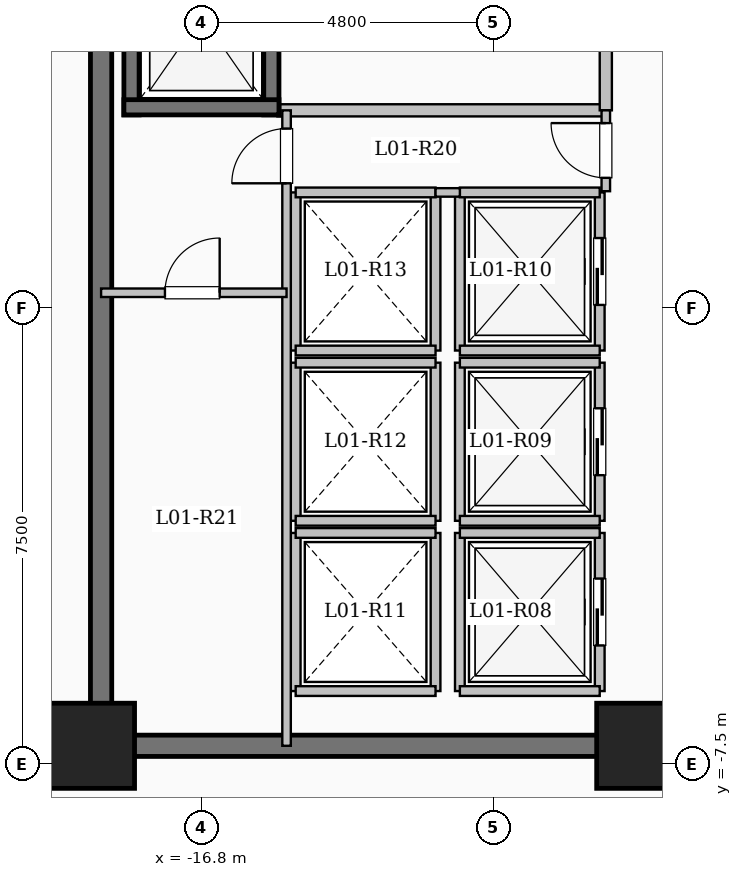
"""IFC4 building model, lengths in metres.
Left out: names, types, materials, properties, quantities, classifications, styles, units other than length and angle.
Written with IfcOpenShell. Run it as: python <this file> out.ifc"""

import sys

from ifc_helpers import new_model, si_unit, direction, frame, frame_2d, origin, origin_2d, place, context, subcontext, project, spatial, rectangle, extrude, element, fill, save


model = new_model("IFC4")
c1 = context("Model", 3, precision=1e-05, world=origin(), true_north=direction((0.0, 1.0)))
c2 = subcontext(c1, "Body", "Model", "MODEL_VIEW")
j1 = project(units=[si_unit("LENGTHUNIT", "METRE"), si_unit("PLANEANGLEUNIT", "RADIAN")], contexts=[c1])
p1 = place(None, origin())
s1 = spatial("IfcSite", under=j1, at=p1, CompositionType="ELEMENT")
p2 = place(p1, origin())
s2 = spatial("IfcBuilding", under=s1, at=p2, CompositionType="ELEMENT")
p3 = place(p2, frame((0.0, 0.0, 5.4)))
s3 = spatial("IfcBuildingStorey", under=s2, at=p3, CompositionType="ELEMENT", Elevation=5.4)
for number, where, z_axis, x_axis in (
    (1, (-9.6, -7.2, 0.0), (0.0, 0.0, 1.0), (1.0, 0.0, 0.0)),
    (2, (-18.6, -7.2, 0.0), (0.0, 0.0, 1.0), (1.0, 0.0, 0.0)),
):
    element("IfcColumn", number, at=place(p3, frame(where, z_axis=z_axis, x_axis=x_axis)), inside=s3, PredefinedType="COLUMN", context=c2, shape_type="SweptSolid", body=[
        extrude(rectangle(XDim=1.4, YDim=1.4, at=origin_2d()), origin(), (0.0, 0.0, 1.0), 4.5),
    ])
p4 = place(p3, frame((-15.55, 3.25, 0.0), z_axis=(0.0, 0.0, 1.0), x_axis=(1.0, 0.0, 0.0)))
e3 = element("IfcWall", 3, at=p4, inside=s3, PredefinedType="SOLIDWALL", context=c2, shape_type="SweptSolid", body=[
    extrude(rectangle(XDim=5.4, YDim=0.2, at=frame_2d((2.7, 0.0))), origin(), (0.0, 0.0, 1.0), 4.2),
])
p5 = place(p3, frame((-10.15, 3.25, 0.0), z_axis=(0.0, 0.0, 1.0), x_axis=(0.0, 1.0, 0.0)))
e4 = element("IfcWall", 4, at=p5, inside=s3, PredefinedType="SOLIDWALL", context=c2, shape_type="SweptSolid", body=[
    extrude(rectangle(XDim=3.25, YDim=0.2, at=frame_2d((1.625, 0.0))), origin(), (0.0, 0.0, 1.0), 4.2),
])
p6 = place(p5, frame((1.1, 0.0, 0.0)))
e5 = element("IfcOpeningElement", 5, at=p6, cuts=e4, PredefinedType="OPENING", context=c2, shape_type="SweptSolid", body=[
    extrude(rectangle(XDim=1.02, YDim=2.15, at=frame_2d((0.51, 1.075))), frame((0.0, 0.11, 0.0), z_axis=(0.0, -1.0, 0.0), x_axis=(1.0, 0.0, 0.0)), (0.0, 0.0, 1.0), 0.22),
])
p7 = place(p3, frame((-17.95, 3.175, 0.0), z_axis=(0.0, 0.0, 1.0), x_axis=(0.0, 1.0, 0.0)))
e6 = element("IfcWall", 6, at=p7, inside=s3, PredefinedType="SHEAR", context=c2, shape_type="SweptSolid", body=[
    extrude(rectangle(XDim=3.25, YDim=0.25, at=frame_2d((1.625, 0.0))), origin(), (0.0, 0.0, 1.0), 4.5),
])
p8 = place(p3, frame((-15.65, 3.175, 0.0), z_axis=(0.0, 0.0, 1.0), x_axis=(0.0, 1.0, 0.0)))
e7 = element("IfcWall", 7, at=p8, inside=s3, PredefinedType="SHEAR", context=c2, shape_type="SweptSolid", body=[
    extrude(rectangle(XDim=3.25, YDim=0.25, at=frame_2d((1.625, 0.0))), origin(), (0.0, 0.0, 1.0), 4.5),
])
p9 = place(p8, frame((1.075, 0.0, 0.0)))
e8 = element("IfcOpeningElement", 8, at=p9, cuts=e7, PredefinedType="OPENING", context=c2, shape_type="SweptSolid", body=[
    extrude(rectangle(XDim=1.1, YDim=2.15, at=frame_2d((0.55, 1.075))), frame((0.0, 0.135, 0.0), z_axis=(0.0, -1.0, 0.0), x_axis=(1.0, 0.0, 0.0)), (0.0, 0.0, 1.0), 0.27),
])
p10 = place(p3, frame((-18.075, 3.3, 0.0), z_axis=(0.0, 0.0, 1.0), x_axis=(1.0, 0.0, 0.0)))
e9 = element("IfcWall", 9, at=p10, inside=s3, PredefinedType="SHEAR", context=c2, shape_type="SweptSolid", body=[
    extrude(rectangle(XDim=2.55, YDim=0.25, at=frame_2d((1.275, 0.0))), origin(), (0.0, 0.0, 1.0), 4.5),
])
p11 = place(p3, frame((-12.55, -6.3, 0.0), z_axis=(0.0, 0.0, 1.0), x_axis=(0.0, 1.0, 0.0)))
e10 = element("IfcWall", 10, at=p11, inside=s3, PredefinedType="SOLIDWALL", context=c2, shape_type="SweptSolid", body=[
    extrude(rectangle(XDim=2.6, YDim=0.16, at=frame_2d((1.3, 0.0))), origin(), (0.0, 0.0, 1.0), 4.2),
])
p12 = place(p3, frame((-10.25, -6.3, 0.0), z_axis=(0.0, 0.0, 1.0), x_axis=(0.0, 1.0, 0.0)))
e11 = element("IfcWall", 11, at=p12, inside=s3, PredefinedType="SOLIDWALL", context=c2, shape_type="SweptSolid", body=[
    extrude(rectangle(XDim=2.6, YDim=0.16, at=frame_2d((1.3, 0.0))), origin(), (0.0, 0.0, 1.0), 4.2),
])
p13 = place(p12, frame((0.75, 0.0, 0.0)))
e12 = element("IfcOpeningElement", 12, at=p13, cuts=e11, PredefinedType="OPENING", context=c2, shape_type="SweptSolid", body=[
    extrude(rectangle(XDim=1.1, YDim=2.15, at=frame_2d((0.55, 1.075))), frame((0.0, 0.09, 0.0), z_axis=(0.0, -1.0, 0.0), x_axis=(1.0, 0.0, 0.0)), (0.0, 0.0, 1.0), 0.18),
])
for number, where, z_axis, x_axis in (
    (13, (-12.55, -6.3, 0.0), (0.0, 0.0, 1.0), (1.0, 0.0, 0.0)),
    (14, (-12.55, -3.7, 0.0), (0.0, 0.0, 1.0), (1.0, 0.0, 0.0)),
):
    element("IfcWall", number, at=place(p3, frame(where, z_axis=z_axis, x_axis=x_axis)), inside=s3, PredefinedType="SOLIDWALL", context=c2, shape_type="SweptSolid", body=[
        extrude(rectangle(XDim=2.3, YDim=0.16, at=frame_2d((1.15, 0.0))), origin(), (0.0, 0.0, 1.0), 4.2),
    ])
p14 = place(p3, frame((-12.55, -3.5, 0.0), z_axis=(0.0, 0.0, 1.0), x_axis=(0.0, 1.0, 0.0)))
e15 = element("IfcWall", 15, at=p14, inside=s3, PredefinedType="SOLIDWALL", context=c2, shape_type="SweptSolid", body=[
    extrude(rectangle(XDim=2.6, YDim=0.16, at=frame_2d((1.3, 0.0))), origin(), (0.0, 0.0, 1.0), 4.2),
])
p15 = place(p3, frame((-10.25, -3.5, 0.0), z_axis=(0.0, 0.0, 1.0), x_axis=(0.0, 1.0, 0.0)))
e16 = element("IfcWall", 16, at=p15, inside=s3, PredefinedType="SOLIDWALL", context=c2, shape_type="SweptSolid", body=[
    extrude(rectangle(XDim=2.6, YDim=0.16, at=frame_2d((1.3, 0.0))), origin(), (0.0, 0.0, 1.0), 4.2),
])
p16 = place(p15, frame((0.75, 0.0, 0.0)))
e17 = element("IfcOpeningElement", 17, at=p16, cuts=e16, PredefinedType="OPENING", context=c2, shape_type="SweptSolid", body=[
    extrude(rectangle(XDim=1.1, YDim=2.15, at=frame_2d((0.55, 1.075))), frame((0.0, 0.09, 0.0), z_axis=(0.0, -1.0, 0.0), x_axis=(1.0, 0.0, 0.0)), (0.0, 0.0, 1.0), 0.18),
])
for number, where, z_axis, x_axis in (
    (18, (-12.55, -3.5, 0.0), (0.0, 0.0, 1.0), (1.0, 0.0, 0.0)),
    (19, (-12.55, -0.9, 0.0), (0.0, 0.0, 1.0), (1.0, 0.0, 0.0)),
):
    element("IfcWall", number, at=place(p3, frame(where, z_axis=z_axis, x_axis=x_axis)), inside=s3, PredefinedType="SOLIDWALL", context=c2, shape_type="SweptSolid", body=[
        extrude(rectangle(XDim=2.3, YDim=0.16, at=frame_2d((1.15, 0.0))), origin(), (0.0, 0.0, 1.0), 4.2),
    ])
p17 = place(p3, frame((-12.55, -0.7, 0.0), z_axis=(0.0, 0.0, 1.0), x_axis=(0.0, 1.0, 0.0)))
e20 = element("IfcWall", 20, at=p17, inside=s3, PredefinedType="SOLIDWALL", context=c2, shape_type="SweptSolid", body=[
    extrude(rectangle(XDim=2.6, YDim=0.16, at=frame_2d((1.3, 0.0))), origin(), (0.0, 0.0, 1.0), 4.2),
])
p18 = place(p3, frame((-10.25, -0.7, 0.0), z_axis=(0.0, 0.0, 1.0), x_axis=(0.0, 1.0, 0.0)))
e21 = element("IfcWall", 21, at=p18, inside=s3, PredefinedType="SOLIDWALL", context=c2, shape_type="SweptSolid", body=[
    extrude(rectangle(XDim=2.6, YDim=0.16, at=frame_2d((1.3, 0.0))), origin(), (0.0, 0.0, 1.0), 4.2),
])
p19 = place(p18, frame((0.75, 0.0, 0.0)))
e22 = element("IfcOpeningElement", 22, at=p19, cuts=e21, PredefinedType="OPENING", context=c2, shape_type="SweptSolid", body=[
    extrude(rectangle(XDim=1.1, YDim=2.15, at=frame_2d((0.55, 1.075))), frame((0.0, 0.09, 0.0), z_axis=(0.0, -1.0, 0.0), x_axis=(1.0, 0.0, 0.0)), (0.0, 0.0, 1.0), 0.18),
])
for number, where, z_axis, x_axis in (
    (23, (-12.55, -0.7, 0.0), (0.0, 0.0, 1.0), (1.0, 0.0, 0.0)),
    (24, (-12.55, 1.9, 0.0), (0.0, 0.0, 1.0), (1.0, 0.0, 0.0)),
):
    element("IfcWall", number, at=place(p3, frame(where, z_axis=z_axis, x_axis=x_axis)), inside=s3, PredefinedType="SOLIDWALL", context=c2, shape_type="SweptSolid", body=[
        extrude(rectangle(XDim=2.3, YDim=0.16, at=frame_2d((1.15, 0.0))), origin(), (0.0, 0.0, 1.0), 4.2),
    ])
for number, where, z_axis, x_axis in (
    (25, (-15.25, -6.3, 0.0), (0.0, 0.0, 1.0), (0.0, 1.0, 0.0)),
    (26, (-12.95, -6.3, 0.0), (0.0, 0.0, 1.0), (0.0, 1.0, 0.0)),
):
    element("IfcWall", number, at=place(p3, frame(where, z_axis=z_axis, x_axis=x_axis)), inside=s3, PredefinedType="SOLIDWALL", context=c2, shape_type="SweptSolid", body=[
        extrude(rectangle(XDim=2.6, YDim=0.16, at=frame_2d((1.3, 0.0))), origin(), (0.0, 0.0, 1.0), 4.2),
    ])
for number, where, z_axis, x_axis in (
    (27, (-15.25, -6.3, 0.0), (0.0, 0.0, 1.0), (1.0, 0.0, 0.0)),
    (28, (-15.25, -3.7, 0.0), (0.0, 0.0, 1.0), (1.0, 0.0, 0.0)),
):
    element("IfcWall", number, at=place(p3, frame(where, z_axis=z_axis, x_axis=x_axis)), inside=s3, PredefinedType="SOLIDWALL", context=c2, shape_type="SweptSolid", body=[
        extrude(rectangle(XDim=2.3, YDim=0.16, at=frame_2d((1.15, 0.0))), origin(), (0.0, 0.0, 1.0), 4.2),
    ])
for number, where, z_axis, x_axis in (
    (29, (-15.25, -3.5, 0.0), (0.0, 0.0, 1.0), (0.0, 1.0, 0.0)),
    (30, (-12.95, -3.5, 0.0), (0.0, 0.0, 1.0), (0.0, 1.0, 0.0)),
):
    element("IfcWall", number, at=place(p3, frame(where, z_axis=z_axis, x_axis=x_axis)), inside=s3, PredefinedType="SOLIDWALL", context=c2, shape_type="SweptSolid", body=[
        extrude(rectangle(XDim=2.6, YDim=0.16, at=frame_2d((1.3, 0.0))), origin(), (0.0, 0.0, 1.0), 4.2),
    ])
for number, where, z_axis, x_axis in (
    (31, (-15.25, -3.5, 0.0), (0.0, 0.0, 1.0), (1.0, 0.0, 0.0)),
    (32, (-15.25, -0.9, 0.0), (0.0, 0.0, 1.0), (1.0, 0.0, 0.0)),
):
    element("IfcWall", number, at=place(p3, frame(where, z_axis=z_axis, x_axis=x_axis)), inside=s3, PredefinedType="SOLIDWALL", context=c2, shape_type="SweptSolid", body=[
        extrude(rectangle(XDim=2.3, YDim=0.16, at=frame_2d((1.15, 0.0))), origin(), (0.0, 0.0, 1.0), 4.2),
    ])
for number, where, z_axis, x_axis in (
    (33, (-15.25, -0.7, 0.0), (0.0, 0.0, 1.0), (0.0, 1.0, 0.0)),
    (34, (-12.95, -0.7, 0.0), (0.0, 0.0, 1.0), (0.0, 1.0, 0.0)),
):
    element("IfcWall", number, at=place(p3, frame(where, z_axis=z_axis, x_axis=x_axis)), inside=s3, PredefinedType="SOLIDWALL", context=c2, shape_type="SweptSolid", body=[
        extrude(rectangle(XDim=2.6, YDim=0.16, at=frame_2d((1.3, 0.0))), origin(), (0.0, 0.0, 1.0), 4.2),
    ])
for number, where, z_axis, x_axis in (
    (35, (-15.25, -0.7, 0.0), (0.0, 0.0, 1.0), (1.0, 0.0, 0.0)),
    (36, (-15.25, 1.9, 0.0), (0.0, 0.0, 1.0), (1.0, 0.0, 0.0)),
):
    element("IfcWall", number, at=place(p3, frame(where, z_axis=z_axis, x_axis=x_axis)), inside=s3, PredefinedType="SOLIDWALL", context=c2, shape_type="SweptSolid", body=[
        extrude(rectangle(XDim=2.3, YDim=0.16, at=frame_2d((1.15, 0.0))), origin(), (0.0, 0.0, 1.0), 4.2),
    ])
p20 = place(p3, frame((-18.45, -7.375, 0.0), z_axis=(0.0, 0.0, 1.0), x_axis=(0.0, 1.0, 0.0)))
e37 = element("IfcWall", 37, at=p20, inside=s3, PredefinedType="SHEAR", context=c2, shape_type="SweptSolid", body=[
    extrude(rectangle(XDim=14.05, YDim=0.35, at=frame_2d((7.025, 0.0))), origin(), (0.0, 0.0, 1.0), 4.5),
])
p21 = place(p3, frame((-18.625, -7.2, 0.0), z_axis=(0.0, 0.0, 1.0), x_axis=(1.0, 0.0, 0.0)))
e38 = element("IfcWall", 38, at=p21, inside=s3, PredefinedType="SHEAR", context=c2, shape_type="SweptSolid", body=[
    extrude(rectangle(XDim=8.55, YDim=0.35, at=frame_2d((4.275, 0.0))), origin(), (0.0, 0.0, 1.0), 4.5),
])
p22 = place(p3, frame((-12.95, 1.9, 0.0), z_axis=(0.0, 0.0, 1.0), x_axis=(1.0, 0.0, 0.0)))
e39 = element("IfcWall", 39, at=p22, inside=s3, PredefinedType="PARTITIONING", context=c2, shape_type="SweptSolid", body=[
    extrude(rectangle(XDim=0.4, YDim=0.14, at=frame_2d((0.2, 0.0))), origin(), (0.0, 0.0, 1.0), 4.2),
])
p23 = place(p3, frame((-10.15, 1.92, 0.0), z_axis=(0.0, 0.0, 1.0), x_axis=(0.0, 1.0, 0.0)))
e40 = element("IfcWall", 40, at=p23, inside=s3, PredefinedType="PARTITIONING", context=c2, shape_type="SweptSolid", body=[
    extrude(rectangle(XDim=1.33, YDim=0.14, at=frame_2d((0.665, 0.0))), origin(), (0.0, 0.0, 1.0), 4.2),
])
p24 = place(p23, frame((0.22, 0.0, 0.0)))
e41 = element("IfcOpeningElement", 41, at=p24, cuts=e40, PredefinedType="OPENING", context=c2, shape_type="SweptSolid", body=[
    extrude(rectangle(XDim=0.9, YDim=2.08, at=frame_2d((0.45, 1.04))), frame((0.0, 0.08, 0.0), z_axis=(0.0, -1.0, 0.0), x_axis=(1.0, 0.0, 0.0)), (0.0, 0.0, 1.0), 0.16),
])
p25 = place(p3, frame((-15.4, -7.2, 0.0), z_axis=(0.0, 0.0, 1.0), x_axis=(0.0, 1.0, 0.0)))
e42 = element("IfcWall", 42, at=p25, inside=s3, PredefinedType="PARTITIONING", context=c2, shape_type="SweptSolid", body=[
    extrude(rectangle(XDim=10.45, YDim=0.14, at=frame_2d((5.225, 0.0))), origin(), (0.0, 0.0, 1.0), 4.2),
])
p26 = place(p25, frame((9.25, 0.0, 0.0)))
e43 = element("IfcOpeningElement", 43, at=p26, cuts=e42, PredefinedType="OPENING", context=c2, shape_type="SweptSolid", body=[
    extrude(rectangle(XDim=0.9, YDim=2.08, at=frame_2d((0.45, 1.04))), frame((0.0, 0.08, 0.0), z_axis=(0.0, -1.0, 0.0), x_axis=(1.0, 0.0, 0.0)), (0.0, 0.0, 1.0), 0.16),
])
p27 = place(p3, frame((-18.45, 0.25, 0.0), z_axis=(0.0, 0.0, 1.0), x_axis=(1.0, 0.0, 0.0)))
e44 = element("IfcWall", 44, at=p27, inside=s3, PredefinedType="PARTITIONING", context=c2, shape_type="SweptSolid", body=[
    extrude(rectangle(XDim=3.05, YDim=0.14, at=frame_2d((1.525, 0.0))), origin(), (0.0, 0.0, 1.0), 4.2),
])
p28 = place(p27, frame((1.05, 0.0, 0.0)))
e45 = element("IfcOpeningElement", 45, at=p28, cuts=e44, PredefinedType="OPENING", context=c2, shape_type="SweptSolid", body=[
    extrude(rectangle(XDim=0.9, YDim=2.08, at=frame_2d((0.45, 1.04))), frame((0.0, 0.08, 0.0), z_axis=(0.0, -1.0, 0.0), x_axis=(1.0, 0.0, 0.0)), (0.0, 0.0, 1.0), 0.16),
])
p29 = place(p3, frame((-28.88, -7.25, 0.0), z_axis=(0.0, 0.0, 1.0), x_axis=(1.0, 0.0, 0.0)))
e46 = element("IfcWall", 46, at=p29, inside=s3, PredefinedType="PARTITIONING", context=c2, shape_type="SweptSolid", body=[
    extrude(rectangle(XDim=10.43, YDim=0.15, at=frame_2d((5.215, 0.0))), origin(), (0.0, 0.0, 1.0), 4.2),
])
p30 = place(p29, frame((2.5, 0.0, 0.0)))
e47 = element("IfcOpeningElement", 47, at=p30, cuts=e46, PredefinedType="OPENING", context=c2, shape_type="SweptSolid", body=[
    extrude(rectangle(XDim=1.08, YDim=2.15, at=frame_2d((0.54, 1.075))), frame((0.0, 0.085, 0.0), z_axis=(0.0, -1.0, 0.0), x_axis=(1.0, 0.0, 0.0)), (0.0, 0.0, 1.0), 0.17),
])
p31 = place(p13, origin())
e48 = element("IfcDoor", 48, at=p31, inside=s3, OperationType="SLIDING_TO_LEFT", PredefinedType="DOOR", context=c2, shape_type="SweptSolid", body=[
    extrude(rectangle(XDim=1.1, YDim=2.15, at=frame_2d((0.55, 1.075))), frame((0.0, 0.025, 0.0), z_axis=(0.0, -1.0, 0.0), x_axis=(1.0, 0.0, 0.0)), (0.0, 0.0, 1.0), 0.05),
])
fill(e12, e48)
p32 = place(p16, origin())
e49 = element("IfcDoor", 49, at=p32, inside=s3, OperationType="SLIDING_TO_LEFT", PredefinedType="DOOR", context=c2, shape_type="SweptSolid", body=[
    extrude(rectangle(XDim=1.1, YDim=2.15, at=frame_2d((0.55, 1.075))), frame((0.0, 0.025, 0.0), z_axis=(0.0, -1.0, 0.0), x_axis=(1.0, 0.0, 0.0)), (0.0, 0.0, 1.0), 0.05),
])
fill(e17, e49)
p33 = place(p19, origin())
e50 = element("IfcDoor", 50, at=p33, inside=s3, OperationType="SLIDING_TO_LEFT", PredefinedType="DOOR", context=c2, shape_type="SweptSolid", body=[
    extrude(rectangle(XDim=1.1, YDim=2.15, at=frame_2d((0.55, 1.075))), frame((0.0, 0.025, 0.0), z_axis=(0.0, -1.0, 0.0), x_axis=(1.0, 0.0, 0.0)), (0.0, 0.0, 1.0), 0.05),
])
fill(e22, e50)
p34 = place(p24, origin())
e51 = element("IfcDoor", 51, at=p34, inside=s3, OperationType="SINGLE_SWING_RIGHT", PredefinedType="DOOR", context=c2, shape_type="SweptSolid", body=[
    extrude(rectangle(XDim=0.9, YDim=2.08, at=frame_2d((0.45, 1.04))), frame((0.0, 0.025, 0.0), z_axis=(0.0, -1.0, 0.0), x_axis=(1.0, 0.0, 0.0)), (0.0, 0.0, 1.0), 0.05),
])
fill(e41, e51)
p35 = place(p26, origin())
e52 = element("IfcDoor", 52, at=p35, inside=s3, OperationType="SINGLE_SWING_LEFT", PredefinedType="DOOR", context=c2, shape_type="SweptSolid", body=[
    extrude(rectangle(XDim=0.9, YDim=2.08, at=frame_2d((0.45, 1.04))), frame((0.0, 0.025, 0.0), z_axis=(0.0, -1.0, 0.0), x_axis=(1.0, 0.0, 0.0)), (0.0, 0.0, 1.0), 0.05),
])
fill(e43, e52)
p36 = place(p28, origin())
e53 = element("IfcDoor", 53, at=p36, inside=s3, OperationType="SINGLE_SWING_RIGHT", PredefinedType="DOOR", context=c2, shape_type="SweptSolid", body=[
    extrude(rectangle(XDim=0.9, YDim=2.08, at=frame_2d((0.45, 1.04))), frame((0.0, 0.025, 0.0), z_axis=(0.0, -1.0, 0.0), x_axis=(1.0, 0.0, 0.0)), (0.0, 0.0, 1.0), 0.05),
])
fill(e45, e53)
save(model, sys.argv[1])
